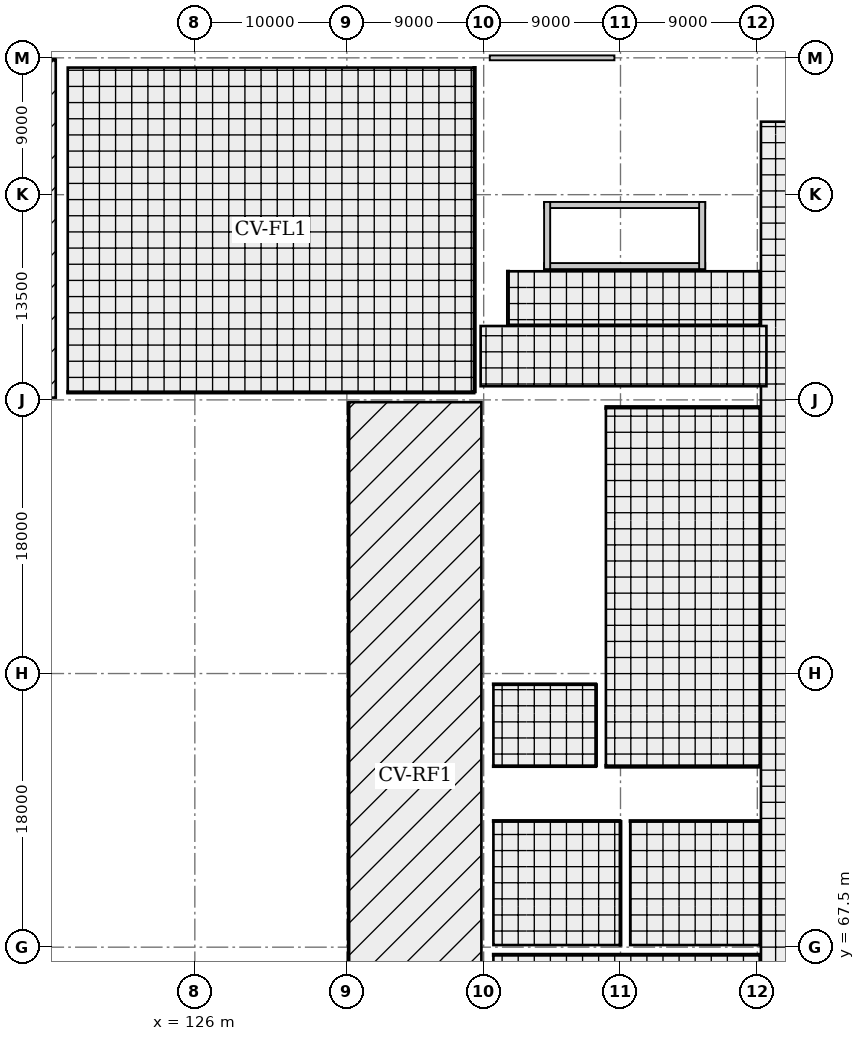
"""IFC4 building model, lengths in metres.
Left out: names, types, materials, properties, quantities, classifications, styles, units other than length and angle.
Written with IfcOpenShell. Run it as: python <this file> out.ifc"""

import sys

from ifc_helpers import new_model, si_unit, direction, frame, frame_2d, origin, origin_2d, place, context, subcontext, project, spatial, rectangle, extrude, element, fill, save


model = new_model("IFC4")
c1 = context("Model", 3, precision=1e-05, world=origin(), true_north=direction((0.0, 1.0)))
c2 = subcontext(c1, "Body", "Model", "MODEL_VIEW")
j1 = project(units=[si_unit("LENGTHUNIT", "METRE"), si_unit("PLANEANGLEUNIT", "RADIAN")], contexts=[c1])
p1 = place(None, origin())
s1 = spatial("IfcSite", under=j1, at=p1, CompositionType="ELEMENT")
p2 = place(p1, origin())
s2 = spatial("IfcBuilding", under=s1, at=p2, CompositionType="ELEMENT")
p3 = place(p2, frame((0.0, 0.0, 6.6)))
s3 = spatial("IfcBuildingStorey", under=s2, at=p3, CompositionType="ELEMENT", Elevation=6.6)
p4 = place(p3, frame((117.0, 103.5, 0.0), z_axis=(0.0, 0.0, 1.0), x_axis=(1.0, 0.0, 0.0)))
e1 = element("IfcColumn", 1, at=p4, inside=s3, PredefinedType="COLUMN", context=c2, shape_type="SweptSolid", body=[
    extrude(rectangle(XDim=1.4, YDim=1.1, at=origin_2d()), origin(), (0.0, 0.0, 1.0), 4.2),
])
for number, where, z_axis, x_axis in (
    (2, (117.0, 117.0, 0.0), (0.0, 0.0, 1.0), (1.0, 0.0, 0.0)),
    (3, (117.0, 126.0, 0.0), (0.0, 0.0, 1.0), (1.0, 0.0, 0.0)),
):
    element("IfcColumn", number, at=place(p3, frame(where, z_axis=z_axis, x_axis=x_axis)), inside=s3, PredefinedType="COLUMN", context=c2, shape_type="SweptSolid", body=[
        extrude(rectangle(XDim=0.8, YDim=0.8, at=origin_2d()), origin(), (0.0, 0.0, 1.0), 4.2),
    ])
for number, where, z_axis, x_axis in (
    (4, (126.0, 67.5, 0.0), (0.0, 0.0, 1.0), (1.0, 0.0, 0.0)),
    (5, (126.0, 76.5, 0.0), (0.0, 0.0, 1.0), (1.0, 0.0, 0.0)),
    (6, (126.0, 85.5, 0.0), (0.0, 0.0, 1.0), (1.0, 0.0, 0.0)),
    (7, (126.0, 94.5, 0.0), (0.0, 0.0, 1.0), (1.0, 0.0, 0.0)),
    (8, (126.0, 103.5, 0.0), (0.0, 0.0, 1.0), (1.0, 0.0, 0.0)),
):
    element("IfcColumn", number, at=place(p3, frame(where, z_axis=z_axis, x_axis=x_axis)), inside=s3, PredefinedType="COLUMN", context=c2, shape_type="SweptSolid", body=[
        extrude(rectangle(XDim=1.4, YDim=1.1, at=origin_2d()), origin(), (0.0, 0.0, 1.0), 4.2),
    ])
for number, where, z_axis, x_axis in (
    (9, (126.0, 117.0, 0.0), (0.0, 0.0, 1.0), (1.0, 0.0, 0.0)),
    (10, (126.0, 126.0, 0.0), (0.0, 0.0, 1.0), (1.0, 0.0, 0.0)),
    (11, (136.0, 103.5, 0.0), (0.0, 0.0, 1.0), (1.0, 0.0, 0.0)),
    (12, (136.0, 117.0, 0.0), (0.0, 0.0, 1.0), (1.0, 0.0, 0.0)),
    (13, (136.0, 126.0, 0.0), (0.0, 0.0, 1.0), (1.0, 0.0, 0.0)),
    (14, (145.0, 67.5, 0.0), (0.0, 0.0, 1.0), (1.0, 0.0, 0.0)),
    (15, (145.0, 76.5, 0.0), (0.0, 0.0, 1.0), (1.0, 0.0, 0.0)),
    (16, (145.0, 85.5, 0.0), (0.0, 0.0, 1.0), (1.0, 0.0, 0.0)),
    (17, (145.0, 94.5, 0.0), (0.0, 0.0, 1.0), (1.0, 0.0, 0.0)),
    (18, (145.0, 103.5, 0.0), (0.0, 0.0, 1.0), (1.0, 0.0, 0.0)),
    (19, (145.0, 117.0, 0.0), (0.0, 0.0, 1.0), (1.0, 0.0, 0.0)),
    (20, (145.0, 126.0, 0.0), (0.0, 0.0, 1.0), (1.0, 0.0, 0.0)),
    (21, (154.0, 67.5, 0.0), (0.0, 0.0, 1.0), (1.0, 0.0, 0.0)),
    (22, (154.0, 76.5, 0.0), (0.0, 0.0, 1.0), (1.0, 0.0, 0.0)),
    (23, (154.0, 85.5, 0.0), (0.0, 0.0, 1.0), (1.0, 0.0, 0.0)),
    (24, (154.0, 94.5, 0.0), (0.0, 0.0, 1.0), (1.0, 0.0, 0.0)),
    (25, (154.0, 103.5, 0.0), (0.0, 0.0, 1.0), (1.0, 0.0, 0.0)),
    (26, (154.0, 117.0, 0.0), (0.0, 0.0, 1.0), (1.0, 0.0, 0.0)),
    (27, (154.0, 126.0, 0.0), (0.0, 0.0, 1.0), (1.0, 0.0, 0.0)),
    (28, (163.0, 67.5, 0.0), (0.0, 0.0, 1.0), (1.0, 0.0, 0.0)),
    (29, (163.0, 76.5, 0.0), (0.0, 0.0, 1.0), (1.0, 0.0, 0.0)),
    (30, (163.0, 85.5, 0.0), (0.0, 0.0, 1.0), (1.0, 0.0, 0.0)),
    (31, (163.0, 94.5, 0.0), (0.0, 0.0, 1.0), (1.0, 0.0, 0.0)),
    (32, (163.0, 103.5, 0.0), (0.0, 0.0, 1.0), (1.0, 0.0, 0.0)),
    (33, (163.0, 117.0, 0.0), (0.0, 0.0, 1.0), (1.0, 0.0, 0.0)),
    (34, (163.0, 126.0, 0.0), (0.0, 0.0, 1.0), (1.0, 0.0, 0.0)),
):
    element("IfcColumn", number, at=place(p3, frame(where, z_axis=z_axis, x_axis=x_axis)), inside=s3, PredefinedType="COLUMN", context=c2, shape_type="SweptSolid", body=[
        extrude(rectangle(XDim=0.8, YDim=0.8, at=origin_2d()), origin(), (0.0, 0.0, 1.0), 4.2),
    ])
p5 = place(p3, frame((145.4, 126.0, 0.0), z_axis=(0.0, 0.0, 1.0), x_axis=(1.0, 0.0, 0.0)))
e35 = element("IfcWall", 35, at=p5, inside=s3, PredefinedType="SOLIDWALL", context=c2, shape_type="SweptSolid", body=[
    extrude(rectangle(XDim=8.2, YDim=0.32, at=frame_2d((4.1, 0.0))), origin(), (0.0, 0.0, 1.0), 3.495),
])
p6 = place(p5, frame((1.19, 0.0, 0.9)))
e36 = element("IfcOpeningElement", 36, at=p6, cuts=e35, PredefinedType="OPENING", context=c2, shape_type="SweptSolid", body=[
    extrude(rectangle(XDim=1.8, YDim=1.8, at=frame_2d((0.9, 0.9))), frame((0.0, 0.17, 0.0), z_axis=(0.0, -1.0, 0.0), x_axis=(1.0, 0.0, 0.0)), (0.0, 0.0, 1.0), 0.34),
])
p7 = place(p5, frame((5.36, 0.0, 0.9)))
e37 = element("IfcOpeningElement", 37, at=p7, cuts=e35, PredefinedType="OPENING", context=c2, shape_type="SweptSolid", body=[
    extrude(rectangle(XDim=1.5, YDim=1.8, at=frame_2d((0.75, 0.9))), frame((0.0, 0.17, 0.0), z_axis=(0.0, -1.0, 0.0), x_axis=(1.0, 0.0, 0.0)), (0.0, 0.0, 1.0), 0.34),
])
p8 = place(p3, frame((0.15, 125.85, 0.0), z_axis=(0.0, 0.0, 1.0), x_axis=(1.0, 0.0, 0.0)))
e38 = element("IfcWall", 38, at=p8, inside=s3, PredefinedType="PARAPET", context=c2, shape_type="SweptSolid", body=[
    extrude(rectangle(XDim=116.7, YDim=0.18, at=frame_2d((58.35, 0.0))), origin(), (0.0, 0.0, 1.0), 1.2),
])
p9 = place(p3, frame((136.15, 54.15, 0.0), z_axis=(0.0, 0.0, 1.0), x_axis=(0.0, 1.0, 0.0)))
e39 = element("IfcWall", 39, at=p9, inside=s3, PredefinedType="PARAPET", context=c2, shape_type="SweptSolid", body=[
    extrude(rectangle(XDim=49.2, YDim=0.18, at=frame_2d((24.6, 0.0))), origin(), (0.0, 0.0, 1.0), 1.2),
])
p10 = place(p3, frame((148.975, 112.3, 0.0), z_axis=(0.0, 0.0, 1.0), x_axis=(1.0, 0.0, 0.0)))
e40 = element("IfcWall", 40, at=p10, inside=s3, PredefinedType="SHEAR", context=c2, shape_type="SweptSolid", body=[
    extrude(rectangle(XDim=10.597, YDim=0.4, at=frame_2d((5.299, 0.0))), origin(), (0.0, 0.0, 1.0), 3.98),
])
p11 = place(p10, frame((0.55, 0.0, 0.0)))
e41 = element("IfcOpeningElement", 41, at=p11, cuts=e40, PredefinedType="OPENING", context=c2, shape_type="SweptSolid", body=[
    extrude(rectangle(XDim=1.3, YDim=2.1, at=frame_2d((0.65, 1.05))), frame((0.0, 0.21, 0.0), z_axis=(0.0, -1.0, 0.0), x_axis=(1.0, 0.0, 0.0)), (0.0, 0.0, 1.0), 0.42),
])
p12 = place(p3, frame((159.573, 116.32, 0.0), z_axis=(0.0, 0.0, 1.0), x_axis=(-1.0, 0.0, 0.0)))
e42 = element("IfcWall", 42, at=p12, inside=s3, PredefinedType="SHEAR", context=c2, shape_type="SweptSolid", body=[
    extrude(rectangle(XDim=10.597, YDim=0.4, at=frame_2d((5.299, 0.0))), origin(), (0.0, 0.0, 1.0), 3.98),
])
for number, where, z_axis, x_axis in (
    (43, (159.373, 112.1, 0.0), (0.0, 0.0, 1.0), (0.0, 1.0, 0.0)),
    (44, (149.175, 116.52, 0.0), (0.0, 0.0, 1.0), (0.0, -1.0, 0.0)),
):
    element("IfcWall", number, at=place(p3, frame(where, z_axis=z_axis, x_axis=x_axis)), inside=s3, PredefinedType="SHEAR", context=c2, shape_type="SweptSolid", body=[
        extrude(rectangle(XDim=4.42, YDim=0.4, at=frame_2d((2.21, 0.0))), origin(), (0.0, 0.0, 1.0), 3.98),
    ])
p13 = place(p3, frame((144.4, 104.0, 0.0), z_axis=(0.0, 0.0, 1.0), x_axis=(-1.0, 0.0, 0.0)))
e45 = element("IfcWall", 45, at=p13, inside=s3, PredefinedType="PARTITIONING", context=c2, shape_type="SweptSolid", body=[
    extrude(rectangle(XDim=26.8, YDim=0.16, at=frame_2d((13.4, 0.0))), origin(), (0.0, 0.0, 1.0), 3.355),
])
p14 = place(p3, frame((144.4, 125.4, 0.0), z_axis=(0.0, 0.0, 1.0), x_axis=(0.0, -1.0, 0.0)))
e46 = element("IfcWall", 46, at=p14, inside=s3, PredefinedType="PARTITIONING", context=c2, shape_type="SweptSolid", body=[
    extrude(rectangle(XDim=21.4, YDim=0.16, at=frame_2d((10.7, 0.0))), origin(), (0.0, 0.0, 1.0), 3.355),
])
p15 = place(p14, frame((9.925, 0.0, 0.0)))
e47 = element("IfcOpeningElement", 47, at=p15, cuts=e46, PredefinedType="OPENING", context=c2, shape_type="SweptSolid", body=[
    extrude(rectangle(XDim=1.55, YDim=2.1, at=frame_2d((0.775, 1.05))), frame((0.0, 0.09, 0.0), z_axis=(0.0, -1.0, 0.0), x_axis=(1.0, 0.0, 0.0)), (0.0, 0.0, 1.0), 0.18),
])
p16 = place(p3, frame((145.6, 67.0, 0.0), z_axis=(0.0, 0.0, 1.0), x_axis=(1.0, 0.0, 0.0)))
e48 = element("IfcWall", 48, at=p16, inside=s3, PredefinedType="PARTITIONING", context=c2, shape_type="SweptSolid", body=[
    extrude(rectangle(XDim=17.6, YDim=0.14, at=frame_2d((8.8, 0.0))), origin(), (0.0, 0.0, 1.0), 3.37),
])
p17 = place(p3, frame((163.2, 67.0, 0.0), z_axis=(0.0, 0.0, 1.0), x_axis=(0.0, -1.0, 0.0)))
e49 = element("IfcWall", 49, at=p17, inside=s3, PredefinedType="PARTITIONING", context=c2, shape_type="SweptSolid", body=[
    extrude(rectangle(XDim=12.4, YDim=0.14, at=frame_2d((6.2, 0.0))), origin(), (0.0, 0.0, 1.0), 3.37),
])
p18 = place(p17, frame((5.575, 0.0, 0.0)))
e50 = element("IfcOpeningElement", 50, at=p18, cuts=e49, PredefinedType="OPENING", context=c2, shape_type="SweptSolid", body=[
    extrude(rectangle(XDim=1.25, YDim=2.1, at=frame_2d((0.625, 1.05))), frame((0.0, 0.08, 0.0), z_axis=(0.0, -1.0, 0.0), x_axis=(1.0, 0.0, 0.0)), (0.0, 0.0, 1.0), 0.16),
])
p19 = place(p3, frame((145.6, 75.8, 0.0), z_axis=(0.0, 0.0, 1.0), x_axis=(1.0, 0.0, 0.0)))
e51 = element("IfcWall", 51, at=p19, inside=s3, PredefinedType="PARTITIONING", context=c2, shape_type="SweptSolid", body=[
    extrude(rectangle(XDim=8.4, YDim=0.13, at=frame_2d((4.2, 0.0))), origin(), (0.0, 0.0, 1.0), 3.515),
])
p20 = place(p19, frame((3.75, 0.0, 0.0)))
e52 = element("IfcOpeningElement", 52, at=p20, cuts=e51, PredefinedType="OPENING", context=c2, shape_type="SweptSolid", body=[
    extrude(rectangle(XDim=0.9, YDim=2.1, at=frame_2d((0.45, 1.05))), frame((0.0, 0.075, 0.0), z_axis=(0.0, -1.0, 0.0), x_axis=(1.0, 0.0, 0.0)), (0.0, 0.0, 1.0), 0.15),
])
p21 = place(p3, frame((154.0, 75.8, 0.0), z_axis=(0.0, 0.0, 1.0), x_axis=(0.0, -1.0, 0.0)))
e53 = element("IfcWall", 53, at=p21, inside=s3, PredefinedType="PARTITIONING", context=c2, shape_type="SweptSolid", body=[
    extrude(rectangle(XDim=8.2, YDim=0.13, at=frame_2d((4.1, 0.0))), origin(), (0.0, 0.0, 1.0), 3.37),
])
p22 = place(p3, frame((154.6, 75.8, 0.0), z_axis=(0.0, 0.0, 1.0), x_axis=(1.0, 0.0, 0.0)))
e54 = element("IfcWall", 54, at=p22, inside=s3, PredefinedType="PARTITIONING", context=c2, shape_type="SweptSolid", body=[
    extrude(rectangle(XDim=8.6, YDim=0.12, at=frame_2d((4.3, 0.0))), origin(), (0.0, 0.0, 1.0), 3.515),
])
p23 = place(p22, frame((3.85, 0.0, 0.0)))
e55 = element("IfcOpeningElement", 55, at=p23, cuts=e54, PredefinedType="OPENING", context=c2, shape_type="SweptSolid", body=[
    extrude(rectangle(XDim=0.9, YDim=2.1, at=frame_2d((0.45, 1.05))), frame((0.0, 0.07, 0.0), z_axis=(0.0, -1.0, 0.0), x_axis=(1.0, 0.0, 0.0)), (0.0, 0.0, 1.0), 0.14),
])
p24 = place(p3, frame((163.2, 75.8, 0.0), z_axis=(0.0, 0.0, 1.0), x_axis=(0.0, -1.0, 0.0)))
e56 = element("IfcWall", 56, at=p24, inside=s3, PredefinedType="PARTITIONING", context=c2, shape_type="SweptSolid", body=[
    extrude(rectangle(XDim=8.2, YDim=0.12, at=frame_2d((4.1, 0.0))), origin(), (0.0, 0.0, 1.0), 3.37),
])
p25 = place(p3, frame((152.4, 79.4, 0.0), z_axis=(0.0, 0.0, 1.0), x_axis=(-1.0, 0.0, 0.0)))
e57 = element("IfcWall", 57, at=p25, inside=s3, PredefinedType="PARTITIONING", context=c2, shape_type="SweptSolid", body=[
    extrude(rectangle(XDim=6.8, YDim=0.11, at=frame_2d((3.4, 0.0))), origin(), (0.0, 0.0, 1.0), 3.565),
])
p26 = place(p25, frame((2.89, 0.0, 0.0)))
e58 = element("IfcOpeningElement", 58, at=p26, cuts=e57, PredefinedType="OPENING", context=c2, shape_type="SweptSolid", body=[
    extrude(rectangle(XDim=1.02, YDim=2.05, at=frame_2d((0.51, 1.025))), frame((0.0, 0.065, 0.0), z_axis=(0.0, -1.0, 0.0), x_axis=(1.0, 0.0, 0.0)), (0.0, 0.0, 1.0), 0.13),
])
p27 = place(p3, frame((145.6, 84.8, 0.0), z_axis=(0.0, 0.0, 1.0), x_axis=(1.0, 0.0, 0.0)))
e59 = element("IfcWall", 59, at=p27, inside=s3, PredefinedType="PARTITIONING", context=c2, shape_type="SweptSolid", body=[
    extrude(rectangle(XDim=6.8, YDim=0.11, at=frame_2d((3.4, 0.0))), origin(), (0.0, 0.0, 1.0), 3.515),
])
p28 = place(p3, frame((152.4, 84.8, 0.0), z_axis=(0.0, 0.0, 1.0), x_axis=(0.0, -1.0, 0.0)))
e60 = element("IfcWall", 60, at=p28, inside=s3, PredefinedType="PARTITIONING", context=c2, shape_type="SweptSolid", body=[
    extrude(rectangle(XDim=5.4, YDim=0.11, at=frame_2d((2.7, 0.0))), origin(), (0.0, 0.0, 1.0), 3.515),
])
p29 = place(p3, frame((163.2, 79.4, 0.0), z_axis=(0.0, 0.0, 1.0), x_axis=(-1.0, 0.0, 0.0)))
e61 = element("IfcWall", 61, at=p29, inside=s3, PredefinedType="PARTITIONING", context=c2, shape_type="SweptSolid", body=[
    extrude(rectangle(XDim=10.2, YDim=0.19, at=frame_2d((5.1, 0.0))), origin(), (0.0, 0.0, 1.0), 3.565),
])
p30 = place(p3, frame((153.0, 103.0, 0.0), z_axis=(0.0, 0.0, 1.0), x_axis=(1.0, 0.0, 0.0)))
e62 = element("IfcWall", 62, at=p30, inside=s3, PredefinedType="PARTITIONING", context=c2, shape_type="SweptSolid", body=[
    extrude(rectangle(XDim=10.2, YDim=0.19, at=frame_2d((5.1, 0.0))), origin(), (0.0, 0.0, 1.0), 3.355),
])
p31 = place(p3, frame((163.2, 103.0, 0.0), z_axis=(0.0, 0.0, 1.0), x_axis=(0.0, -1.0, 0.0)))
e63 = element("IfcWall", 63, at=p31, inside=s3, PredefinedType="PARTITIONING", context=c2, shape_type="SweptSolid", body=[
    extrude(rectangle(XDim=23.6, YDim=0.19, at=frame_2d((11.8, 0.0))), origin(), (0.0, 0.0, 1.0), 3.355),
])
p32 = place(p31, frame((11.225, 0.0, 0.0)))
e64 = element("IfcOpeningElement", 64, at=p32, cuts=e63, PredefinedType="OPENING", context=c2, shape_type="SweptSolid", body=[
    extrude(rectangle(XDim=1.15, YDim=2.1, at=frame_2d((0.575, 1.05))), frame((0.0, 0.105, 0.0), z_axis=(0.0, -1.0, 0.0), x_axis=(1.0, 0.0, 0.0)), (0.0, 0.0, 1.0), 0.21),
])
p33 = place(p3, frame((163.2, 108.4, 0.0), z_axis=(0.0, 0.0, 1.0), x_axis=(-1.0, 0.0, 0.0)))
e65 = element("IfcWall", 65, at=p33, inside=s3, PredefinedType="PARTITIONING", context=c2, shape_type="SweptSolid", body=[
    extrude(rectangle(XDim=16.6, YDim=0.14, at=frame_2d((8.3, 0.0))), origin(), (0.0, 0.0, 1.0), 3.355),
])
p34 = place(p33, frame((7.725, 0.0, 0.0)))
e66 = element("IfcOpeningElement", 66, at=p34, cuts=e65, PredefinedType="OPENING", context=c2, shape_type="SweptSolid", body=[
    extrude(rectangle(XDim=1.15, YDim=2.1, at=frame_2d((0.575, 1.05))), frame((0.0, 0.08, 0.0), z_axis=(0.0, -1.0, 0.0), x_axis=(1.0, 0.0, 0.0)), (0.0, 0.0, 1.0), 0.16),
])
p35 = place(p3, frame((146.6, 108.4, 0.0), z_axis=(0.0, 0.0, 1.0), x_axis=(0.0, 1.0, 0.0)))
e67 = element("IfcWall", 67, at=p35, inside=s3, PredefinedType="PARTITIONING", context=c2, shape_type="SweptSolid", body=[
    extrude(rectangle(XDim=3.6, YDim=0.14, at=frame_2d((1.8, 0.0))), origin(), (0.0, 0.0, 1.0), 3.955),
])
p36 = place(p3, frame((163.2, 112.0, 0.0), z_axis=(0.0, 0.0, 1.0), x_axis=(0.0, -1.0, 0.0)))
e68 = element("IfcWall", 68, at=p36, inside=s3, PredefinedType="PARTITIONING", context=c2, shape_type="SweptSolid", body=[
    extrude(rectangle(XDim=3.6, YDim=0.14, at=frame_2d((1.8, 0.0))), origin(), (0.0, 0.0, 1.0), 3.355),
])
p37 = place(p6, origin())
e69 = element("IfcWindow", 69, at=p37, inside=s3, PartitioningType="SINGLE_PANEL", PredefinedType="WINDOW", context=c2, shape_type="SweptSolid", body=[
    extrude(rectangle(XDim=1.8, YDim=1.8, at=frame_2d((0.9, 0.9))), frame((0.0, 0.03, 0.0), z_axis=(0.0, -1.0, 0.0), x_axis=(1.0, 0.0, 0.0)), (0.0, 0.0, 1.0), 0.06),
])
fill(e36, e69)
p38 = place(p7, origin())
e70 = element("IfcWindow", 70, at=p38, inside=s3, PartitioningType="SINGLE_PANEL", PredefinedType="WINDOW", context=c2, shape_type="SweptSolid", body=[
    extrude(rectangle(XDim=1.5, YDim=1.8, at=frame_2d((0.75, 0.9))), frame((0.0, 0.03, 0.0), z_axis=(0.0, -1.0, 0.0), x_axis=(1.0, 0.0, 0.0)), (0.0, 0.0, 1.0), 0.06),
])
fill(e37, e70)
p39 = place(p11, origin())
e71 = element("IfcDoor", 71, at=p39, inside=s3, OperationType="SINGLE_SWING_LEFT", PredefinedType="DOOR", context=c2, shape_type="SweptSolid", body=[
    extrude(rectangle(XDim=1.3, YDim=2.1, at=frame_2d((0.65, 1.05))), frame((0.0, 0.025, 0.0), z_axis=(0.0, -1.0, 0.0), x_axis=(1.0, 0.0, 0.0)), (0.0, 0.0, 1.0), 0.05),
])
fill(e41, e71)
p40 = place(p15, origin())
e72 = element("IfcDoor", 72, at=p40, inside=s3, OperationType="SINGLE_SWING_LEFT", PredefinedType="DOOR", context=c2, shape_type="SweptSolid", body=[
    extrude(rectangle(XDim=1.55, YDim=2.1, at=frame_2d((0.775, 1.05))), frame((0.0, 0.025, 0.0), z_axis=(0.0, -1.0, 0.0), x_axis=(1.0, 0.0, 0.0)), (0.0, 0.0, 1.0), 0.05),
])
fill(e47, e72)
p41 = place(p20, origin())
e73 = element("IfcDoor", 73, at=p41, inside=s3, OperationType="SINGLE_SWING_RIGHT", PredefinedType="DOOR", context=c2, shape_type="SweptSolid", body=[
    extrude(rectangle(XDim=0.9, YDim=2.1, at=frame_2d((0.45, 1.05))), frame((0.0, 0.025, 0.0), z_axis=(0.0, -1.0, 0.0), x_axis=(1.0, 0.0, 0.0)), (0.0, 0.0, 1.0), 0.05),
])
fill(e52, e73)
p42 = place(p23, origin())
e74 = element("IfcDoor", 74, at=p42, inside=s3, OperationType="SINGLE_SWING_LEFT", PredefinedType="DOOR", context=c2, shape_type="SweptSolid", body=[
    extrude(rectangle(XDim=0.9, YDim=2.1, at=frame_2d((0.45, 1.05))), frame((0.0, 0.025, 0.0), z_axis=(0.0, -1.0, 0.0), x_axis=(1.0, 0.0, 0.0)), (0.0, 0.0, 1.0), 0.05),
])
fill(e55, e74)
p43 = place(p26, origin())
e75 = element("IfcDoor", 75, at=p43, inside=s3, OperationType="SINGLE_SWING_RIGHT", PredefinedType="DOOR", context=c2, shape_type="SweptSolid", body=[
    extrude(rectangle(XDim=1.02, YDim=2.05, at=frame_2d((0.51, 1.025))), frame((0.0, 0.025, 0.0), z_axis=(0.0, -1.0, 0.0), x_axis=(1.0, 0.0, 0.0)), (0.0, 0.0, 1.0), 0.05),
])
fill(e58, e75)
p44 = place(p32, origin())
e76 = element("IfcDoor", 76, at=p44, inside=s3, OperationType="SINGLE_SWING_LEFT", PredefinedType="DOOR", context=c2, shape_type="SweptSolid", body=[
    extrude(rectangle(XDim=1.15, YDim=2.1, at=frame_2d((0.575, 1.05))), frame((0.0, 0.025, 0.0), z_axis=(0.0, -1.0, 0.0), x_axis=(1.0, 0.0, 0.0)), (0.0, 0.0, 1.0), 0.05),
])
fill(e64, e76)
p45 = place(p34, origin())
e77 = element("IfcDoor", 77, at=p45, inside=s3, OperationType="SINGLE_SWING_LEFT", PredefinedType="DOOR", context=c2, shape_type="SweptSolid", body=[
    extrude(rectangle(XDim=1.15, YDim=2.1, at=frame_2d((0.575, 1.05))), frame((0.0, 0.025, 0.0), z_axis=(0.0, -1.0, 0.0), x_axis=(1.0, 0.0, 0.0)), (0.0, 0.0, 1.0), 0.05),
])
fill(e66, e77)
save(model, sys.argv[1])
